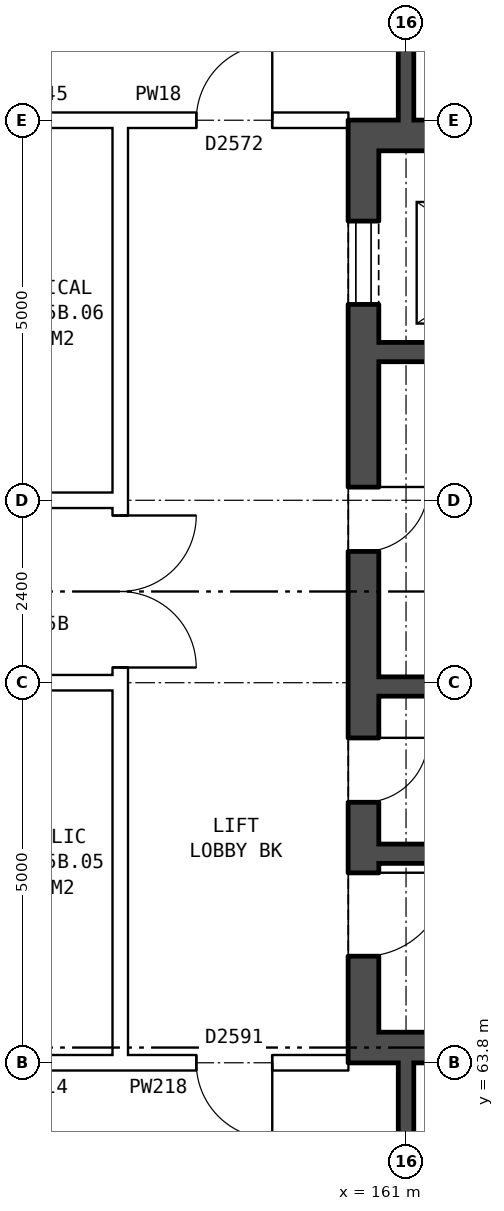
"""IFC4 building model, lengths in metres.
Left out: names, types, materials, properties, quantities, classifications, styles, units other than length and angle.
Written with IfcOpenShell. Run it as: python <this file> out.ifc"""

import sys

from ifc_helpers import new_model, si_unit, direction, frame, frame_2d, origin, place, context, subcontext, project, spatial, rectangle, extrude, element, fill, save


model = new_model("IFC4")
c1 = context("Model", 3, precision=1e-05, world=origin(), true_north=direction((0.0, 1.0)))
c2 = subcontext(c1, "Body", "Model", "MODEL_VIEW")
j1 = project(units=[si_unit("LENGTHUNIT", "METRE"), si_unit("PLANEANGLEUNIT", "RADIAN")], contexts=[c1])
p1 = place(None, origin())
s1 = spatial("IfcSite", under=j1, at=p1, CompositionType="ELEMENT")
p2 = place(p1, origin())
s2 = spatial("IfcBuilding", under=s1, at=p2, CompositionType="ELEMENT")
p3 = place(p2, frame((0.0, 0.0, 230.7)))
s3 = spatial("IfcBuildingStorey", under=s2, at=p3, CompositionType="ELEMENT", Elevation=230.7)
p4 = place(p3, frame((160.44, 76.2, 0.0), z_axis=(0.0, 0.0, 1.0), x_axis=(0.0, -1.0, 0.0)))
e1 = element("IfcWall", 1, at=p4, inside=s3, PredefinedType="SHEAR", context=c2, shape_type="SweptSolid", body=[
    extrude(rectangle(XDim=12.4, YDim=0.4, at=frame_2d((6.2, 0.0))), origin(), (0.0, 0.0, 1.0), 2.85),
])
p5 = place(p4, frame((1.325, 0.0, 0.0)))
e2 = element("IfcOpeningElement", 2, at=p5, cuts=e1, PredefinedType="OPENING", context=c2, shape_type="SweptSolid", body=[
    extrude(rectangle(XDim=1.1, YDim=2.1, at=frame_2d((0.55, 1.05))), frame((0.0, 0.21, 0.0), z_axis=(0.0, -1.0, 0.0), x_axis=(1.0, 0.0, 0.0)), (0.0, 0.0, 1.0), 0.42),
])
p6 = place(p4, frame((4.825, 0.0, 0.0)))
e3 = element("IfcOpeningElement", 3, at=p6, cuts=e1, PredefinedType="OPENING", context=c2, shape_type="SweptSolid", body=[
    extrude(rectangle(XDim=0.85, YDim=2.1, at=frame_2d((0.425, 1.05))), frame((0.0, 0.21, 0.0), z_axis=(0.0, -1.0, 0.0), x_axis=(1.0, 0.0, 0.0)), (0.0, 0.0, 1.0), 0.42),
])
p7 = place(p4, frame((9.9, 0.0, 0.0)))
e4 = element("IfcOpeningElement", 4, at=p7, cuts=e1, PredefinedType="OPENING", context=c2, shape_type="SweptSolid", body=[
    extrude(rectangle(XDim=1.1, YDim=2.1, at=frame_2d((0.55, 1.05))), frame((0.0, 0.21, 0.0), z_axis=(0.0, -1.0, 0.0), x_axis=(1.0, 0.0, 0.0)), (0.0, 0.0, 1.0), 0.42),
])
p8 = place(p4, frame((8.125, 0.0, 0.0)))
e5 = element("IfcOpeningElement", 5, at=p8, cuts=e1, PredefinedType="OPENING", context=c2, shape_type="SweptSolid", body=[
    extrude(rectangle(XDim=0.85, YDim=2.1, at=frame_2d((0.425, 1.05))), frame((0.0, 0.21, 0.0), z_axis=(0.0, -1.0, 0.0), x_axis=(1.0, 0.0, 0.0)), (0.0, 0.0, 1.0), 0.42),
])
for number, where, z_axis, x_axis in (
    (6, (160.64, 76.0, 0.0), (0.0, 0.0, 1.0), (1.0, 0.0, 0.0)),
    (7, (160.64, 64.0, 0.0), (0.0, 0.0, 1.0), (1.0, 0.0, 0.0)),
):
    element("IfcWall", number, at=place(p3, frame(where, z_axis=z_axis, x_axis=x_axis)), inside=s3, PredefinedType="SHEAR", context=c2, shape_type="SweptSolid", body=[
        extrude(rectangle(XDim=7.6, YDim=0.4, at=frame_2d((3.8, 0.0))), origin(), (0.0, 0.0, 1.0), 2.85),
    ])
p9 = place(p3, frame((160.64, 73.15, 0.0), z_axis=(0.0, 0.0, 1.0), x_axis=(1.0, 0.0, 0.0)))
e8 = element("IfcWall", 8, at=p9, inside=s3, PredefinedType="SHEAR", context=c2, shape_type="SweptSolid", body=[
    extrude(rectangle(XDim=4.775, YDim=0.25, at=frame_2d((2.388, 0.0))), origin(), (0.0, 0.0, 1.0), 2.85),
])
p10 = place(p3, frame((160.64, 68.75, 0.0), z_axis=(0.0, 0.0, 1.0), x_axis=(1.0, 0.0, 0.0)))
e9 = element("IfcWall", 9, at=p10, inside=s3, PredefinedType="SHEAR", context=c2, shape_type="SweptSolid", body=[
    extrude(rectangle(XDim=7.6, YDim=0.25, at=frame_2d((3.8, 0.0))), origin(), (0.0, 0.0, 1.0), 2.85),
])
p11 = place(p10, frame((5.175, 0.0, 0.0)))
e10 = element("IfcOpeningElement", 10, at=p11, cuts=e9, PredefinedType="OPENING", context=c2, shape_type="SweptSolid", body=[
    extrude(rectangle(XDim=1.1, YDim=2.1, at=frame_2d((0.55, 1.05))), frame((0.0, 0.135, 0.0), z_axis=(0.0, -1.0, 0.0), x_axis=(1.0, 0.0, 0.0)), (0.0, 0.0, 1.0), 0.27),
])
p12 = place(p10, frame((2.975, 0.0, 0.0)))
e11 = element("IfcOpeningElement", 11, at=p12, cuts=e9, PredefinedType="OPENING", context=c2, shape_type="SweptSolid", body=[
    extrude(rectangle(XDim=0.85, YDim=2.1, at=frame_2d((0.425, 1.05))), frame((0.0, 0.135, 0.0), z_axis=(0.0, -1.0, 0.0), x_axis=(1.0, 0.0, 0.0)), (0.0, 0.0, 1.0), 0.27),
])
p13 = place(p3, frame((160.64, 66.55, 0.0), z_axis=(0.0, 0.0, 1.0), x_axis=(1.0, 0.0, 0.0)))
e12 = element("IfcWall", 12, at=p13, inside=s3, PredefinedType="SHEAR", context=c2, shape_type="SweptSolid", body=[
    extrude(rectangle(XDim=2.525, YDim=0.25, at=frame_2d((1.263, 0.0))), origin(), (0.0, 0.0, 1.0), 2.85),
])
p14 = place(p3, frame((157.24, 63.9, 0.0), z_axis=(0.0, 0.0, 1.0), x_axis=(0.0, 1.0, 0.0)))
e13 = element("IfcWall", 13, at=p14, inside=s3, PredefinedType="PARTITIONING", context=c2, shape_type="SweptSolid", body=[
    extrude(rectangle(XDim=12.2, YDim=0.2, at=frame_2d((6.1, 0.0))), origin(), (0.0, 0.0, 1.0), 2.85),
])
p15 = place(p14, frame((5.1, 0.0, 0.0)))
e14 = element("IfcOpeningElement", 14, at=p15, cuts=e13, PredefinedType="OPENING", context=c2, shape_type="SweptSolid", body=[
    extrude(rectangle(XDim=2.0, YDim=2.1, at=frame_2d((1.0, 1.05))), frame((0.0, 0.11, 0.0), z_axis=(0.0, -1.0, 0.0), x_axis=(1.0, 0.0, 0.0)), (0.0, 0.0, 1.0), 0.22),
])
p16 = place(p3, frame((155.1, 63.8, 0.0), z_axis=(0.0, 0.0, 1.0), x_axis=(1.0, 0.0, 0.0)))
e15 = element("IfcWall", 15, at=p16, inside=s3, PredefinedType="PARTITIONING", context=c2, shape_type="SweptSolid", body=[
    extrude(rectangle(XDim=2.14, YDim=0.2, at=frame_2d((1.07, 0.0))), origin(), (0.0, 0.0, 1.0), 2.85),
])
p17 = place(p3, frame((157.24, 63.8, 0.0), z_axis=(0.0, 0.0, 1.0), x_axis=(1.0, 0.0, 0.0)))
e16 = element("IfcWall", 16, at=p17, inside=s3, PredefinedType="PARTITIONING", context=c2, shape_type="SweptSolid", body=[
    extrude(rectangle(XDim=3.0, YDim=0.2, at=frame_2d((1.5, 0.0))), origin(), (0.0, 0.0, 1.0), 2.85),
])
p18 = place(p17, frame((1.0, 0.0, 0.0)))
e17 = element("IfcOpeningElement", 17, at=p18, cuts=e16, PredefinedType="OPENING", context=c2, shape_type="SweptSolid", body=[
    extrude(rectangle(XDim=1.0, YDim=2.1, at=frame_2d((0.5, 1.05))), frame((0.0, 0.11, 0.0), z_axis=(0.0, -1.0, 0.0), x_axis=(1.0, 0.0, 0.0)), (0.0, 0.0, 1.0), 0.22),
])
p19 = place(p3, frame((142.76, 68.8, 0.0), z_axis=(0.0, 0.0, 1.0), x_axis=(1.0, 0.0, 0.0)))
e18 = element("IfcWall", 18, at=p19, inside=s3, PredefinedType="PARTITIONING", context=c2, shape_type="SweptSolid", body=[
    extrude(rectangle(XDim=14.48, YDim=0.2, at=frame_2d((7.24, 0.0))), origin(), (0.0, 0.0, 1.0), 2.85),
])
p20 = place(p19, frame((4.24, 0.0, 0.0)))
e19 = element("IfcOpeningElement", 19, at=p20, cuts=e18, PredefinedType="OPENING", context=c2, shape_type="SweptSolid", body=[
    extrude(rectangle(XDim=1.0, YDim=2.1, at=frame_2d((0.5, 1.05))), frame((0.0, 0.11, 0.0), z_axis=(0.0, -1.0, 0.0), x_axis=(1.0, 0.0, 0.0)), (0.0, 0.0, 1.0), 0.22),
])
p21 = place(p19, frame((10.24, 0.0, 0.0)))
e20 = element("IfcOpeningElement", 20, at=p21, cuts=e18, PredefinedType="OPENING", context=c2, shape_type="SweptSolid", body=[
    extrude(rectangle(XDim=1.0, YDim=2.1, at=frame_2d((0.5, 1.05))), frame((0.0, 0.11, 0.0), z_axis=(0.0, -1.0, 0.0), x_axis=(1.0, 0.0, 0.0)), (0.0, 0.0, 1.0), 0.22),
])
p22 = place(p3, frame((142.76, 71.2, 0.0), z_axis=(0.0, 0.0, 1.0), x_axis=(1.0, 0.0, 0.0)))
e21 = element("IfcWall", 21, at=p22, inside=s3, PredefinedType="PARTITIONING", context=c2, shape_type="SweptSolid", body=[
    extrude(rectangle(XDim=14.48, YDim=0.2, at=frame_2d((7.24, 0.0))), origin(), (0.0, 0.0, 1.0), 2.85),
])
p23 = place(p22, frame((4.24, 0.0, 0.0)))
e22 = element("IfcOpeningElement", 22, at=p23, cuts=e21, PredefinedType="OPENING", context=c2, shape_type="SweptSolid", body=[
    extrude(rectangle(XDim=1.0, YDim=2.1, at=frame_2d((0.5, 1.05))), frame((0.0, 0.11, 0.0), z_axis=(0.0, -1.0, 0.0), x_axis=(1.0, 0.0, 0.0)), (0.0, 0.0, 1.0), 0.22),
])
p24 = place(p22, frame((10.24, 0.0, 0.0)))
e23 = element("IfcOpeningElement", 23, at=p24, cuts=e21, PredefinedType="OPENING", context=c2, shape_type="SweptSolid", body=[
    extrude(rectangle(XDim=1.0, YDim=2.1, at=frame_2d((0.5, 1.05))), frame((0.0, 0.11, 0.0), z_axis=(0.0, -1.0, 0.0), x_axis=(1.0, 0.0, 0.0)), (0.0, 0.0, 1.0), 0.22),
])
p25 = place(p3, frame((155.1, 76.2, 0.0), z_axis=(0.0, 0.0, 1.0), x_axis=(1.0, 0.0, 0.0)))
e24 = element("IfcWall", 24, at=p25, inside=s3, PredefinedType="PARTITIONING", context=c2, shape_type="SweptSolid", body=[
    extrude(rectangle(XDim=2.14, YDim=0.2, at=frame_2d((1.07, 0.0))), origin(), (0.0, 0.0, 1.0), 2.85),
])
p26 = place(p3, frame((157.24, 76.2, 0.0), z_axis=(0.0, 0.0, 1.0), x_axis=(1.0, 0.0, 0.0)))
e25 = element("IfcWall", 25, at=p26, inside=s3, PredefinedType="PARTITIONING", context=c2, shape_type="SweptSolid", body=[
    extrude(rectangle(XDim=3.0, YDim=0.2, at=frame_2d((1.5, 0.0))), origin(), (0.0, 0.0, 1.0), 2.85),
])
p27 = place(p26, frame((1.0, 0.0, 0.0)))
e26 = element("IfcOpeningElement", 26, at=p27, cuts=e25, PredefinedType="OPENING", context=c2, shape_type="SweptSolid", body=[
    extrude(rectangle(XDim=1.0, YDim=2.1, at=frame_2d((0.5, 1.05))), frame((0.0, 0.11, 0.0), z_axis=(0.0, -1.0, 0.0), x_axis=(1.0, 0.0, 0.0)), (0.0, 0.0, 1.0), 0.22),
])
p28 = place(p3, frame((161.0, 54.36, 0.0), z_axis=(0.0, 0.0, 1.0), x_axis=(0.0, 1.0, 0.0)))
e27 = element("IfcWall", 27, at=p28, inside=s3, PredefinedType="SOLIDWALL", context=c2, shape_type="SweptSolid", body=[
    extrude(rectangle(XDim=9.44, YDim=0.2, at=frame_2d((4.72, 0.0))), origin(), (0.0, 0.0, 1.0), 2.85),
])
p29 = place(p28, frame((1.37, 0.0, 0.0)))
e28 = element("IfcOpeningElement", 28, at=p29, cuts=e27, PredefinedType="OPENING", context=c2, shape_type="SweptSolid", body=[
    extrude(rectangle(XDim=0.9, YDim=2.1, at=frame_2d((0.45, 1.05))), frame((0.0, 0.11, 0.0), z_axis=(0.0, -1.0, 0.0), x_axis=(1.0, 0.0, 0.0)), (0.0, 0.0, 1.0), 0.22),
])
p30 = place(p28, frame((4.44, 0.0, 0.0)))
e29 = element("IfcOpeningElement", 29, at=p30, cuts=e27, PredefinedType="OPENING", context=c2, shape_type="SweptSolid", body=[
    extrude(rectangle(XDim=0.9, YDim=2.1, at=frame_2d((0.45, 1.05))), frame((0.0, 0.11, 0.0), z_axis=(0.0, -1.0, 0.0), x_axis=(1.0, 0.0, 0.0)), (0.0, 0.0, 1.0), 0.22),
])
p31 = place(p28, frame((7.59, 0.0, 0.0)))
e30 = element("IfcOpeningElement", 30, at=p31, cuts=e27, PredefinedType="OPENING", context=c2, shape_type="SweptSolid", body=[
    extrude(rectangle(XDim=0.9, YDim=2.1, at=frame_2d((0.45, 1.05))), frame((0.0, 0.11, 0.0), z_axis=(0.0, -1.0, 0.0), x_axis=(1.0, 0.0, 0.0)), (0.0, 0.0, 1.0), 0.22),
])
p32 = place(p3, frame((161.0, 76.2, 0.0), z_axis=(0.0, 0.0, 1.0), x_axis=(0.0, 1.0, 0.0)))
e31 = element("IfcWall", 31, at=p32, inside=s3, PredefinedType="SOLIDWALL", context=c2, shape_type="SweptSolid", body=[
    extrude(rectangle(XDim=9.44, YDim=0.2, at=frame_2d((4.72, 0.0))), origin(), (0.0, 0.0, 1.0), 2.85),
])
p33 = place(p32, frame((1.2, 0.0, 0.0)))
e32 = element("IfcOpeningElement", 32, at=p33, cuts=e31, PredefinedType="OPENING", context=c2, shape_type="SweptSolid", body=[
    extrude(rectangle(XDim=0.9, YDim=2.1, at=frame_2d((0.45, 1.05))), frame((0.0, 0.11, 0.0), z_axis=(0.0, -1.0, 0.0), x_axis=(1.0, 0.0, 0.0)), (0.0, 0.0, 1.0), 0.22),
])
p34 = place(p5, origin())
e33 = element("IfcDoor", 33, at=p34, inside=s3, OperationType="DOUBLE_DOOR_SLIDING", PredefinedType="DOOR", context=c2, shape_type="SweptSolid", body=[
    extrude(rectangle(XDim=1.1, YDim=2.1, at=frame_2d((0.55, 1.05))), frame((0.0, 0.185, 0.0), z_axis=(0.0, -1.0, 0.0), x_axis=(1.0, 0.0, 0.0)), (0.0, 0.0, 1.0), 0.05),
])
fill(e2, e33)
p35 = place(p6, origin())
e34 = element("IfcDoor", 34, at=p35, inside=s3, OperationType="SINGLE_SWING_LEFT", PredefinedType="DOOR", context=c2, shape_type="SweptSolid", body=[
    extrude(rectangle(XDim=0.85, YDim=2.1, at=frame_2d((0.425, 1.05))), frame((0.0, 0.185, 0.0), z_axis=(0.0, -1.0, 0.0), x_axis=(1.0, 0.0, 0.0)), (0.0, 0.0, 1.0), 0.05),
])
fill(e3, e34)
p36 = place(p7, origin())
e35 = element("IfcDoor", 35, at=p36, inside=s3, OperationType="SINGLE_SWING_LEFT", PredefinedType="DOOR", context=c2, shape_type="SweptSolid", body=[
    extrude(rectangle(XDim=1.1, YDim=2.1, at=frame_2d((0.55, 1.05))), frame((0.0, 0.185, 0.0), z_axis=(0.0, -1.0, 0.0), x_axis=(1.0, 0.0, 0.0)), (0.0, 0.0, 1.0), 0.05),
])
fill(e4, e35)
p37 = place(p8, origin())
e36 = element("IfcDoor", 36, at=p37, inside=s3, OperationType="SINGLE_SWING_LEFT", PredefinedType="DOOR", context=c2, shape_type="SweptSolid", body=[
    extrude(rectangle(XDim=0.85, YDim=2.1, at=frame_2d((0.425, 1.05))), frame((0.0, 0.185, 0.0), z_axis=(0.0, -1.0, 0.0), x_axis=(1.0, 0.0, 0.0)), (0.0, 0.0, 1.0), 0.05),
])
fill(e5, e36)
p38 = place(p15, frame((2.0, 0.0, 0.0), z_axis=(0.0, 0.0, 1.0), x_axis=(-1.0, 0.0, 0.0)))
e37 = element("IfcDoor", 37, at=p38, inside=s3, OperationType="DOUBLE_DOOR_SINGLE_SWING", PredefinedType="DOOR", context=c2, shape_type="SweptSolid", body=[
    extrude(rectangle(XDim=2.0, YDim=2.1, at=frame_2d((1.0, 1.05))), frame((0.0, 0.025, 0.0), z_axis=(0.0, -1.0, 0.0), x_axis=(1.0, 0.0, 0.0)), (0.0, 0.0, 1.0), 0.05),
])
fill(e14, e37)
p39 = place(p18, frame((1.0, 0.0, 0.0), z_axis=(0.0, 0.0, 1.0), x_axis=(-1.0, 0.0, 0.0)))
e38 = element("IfcDoor", 38, at=p39, inside=s3, OperationType="SINGLE_SWING_LEFT", PredefinedType="DOOR", context=c2, shape_type="SweptSolid", body=[
    extrude(rectangle(XDim=1.0, YDim=2.1, at=frame_2d((0.5, 1.05))), frame((0.0, 0.025, 0.0), z_axis=(0.0, -1.0, 0.0), x_axis=(1.0, 0.0, 0.0)), (0.0, 0.0, 1.0), 0.05),
])
fill(e17, e38)
p40 = place(p27, origin())
e39 = element("IfcDoor", 39, at=p40, inside=s3, OperationType="SINGLE_SWING_RIGHT", PredefinedType="DOOR", context=c2, shape_type="SweptSolid", body=[
    extrude(rectangle(XDim=1.0, YDim=2.1, at=frame_2d((0.5, 1.05))), frame((0.0, 0.025, 0.0), z_axis=(0.0, -1.0, 0.0), x_axis=(1.0, 0.0, 0.0)), (0.0, 0.0, 1.0), 0.05),
])
fill(e26, e39)
save(model, sys.argv[1])
